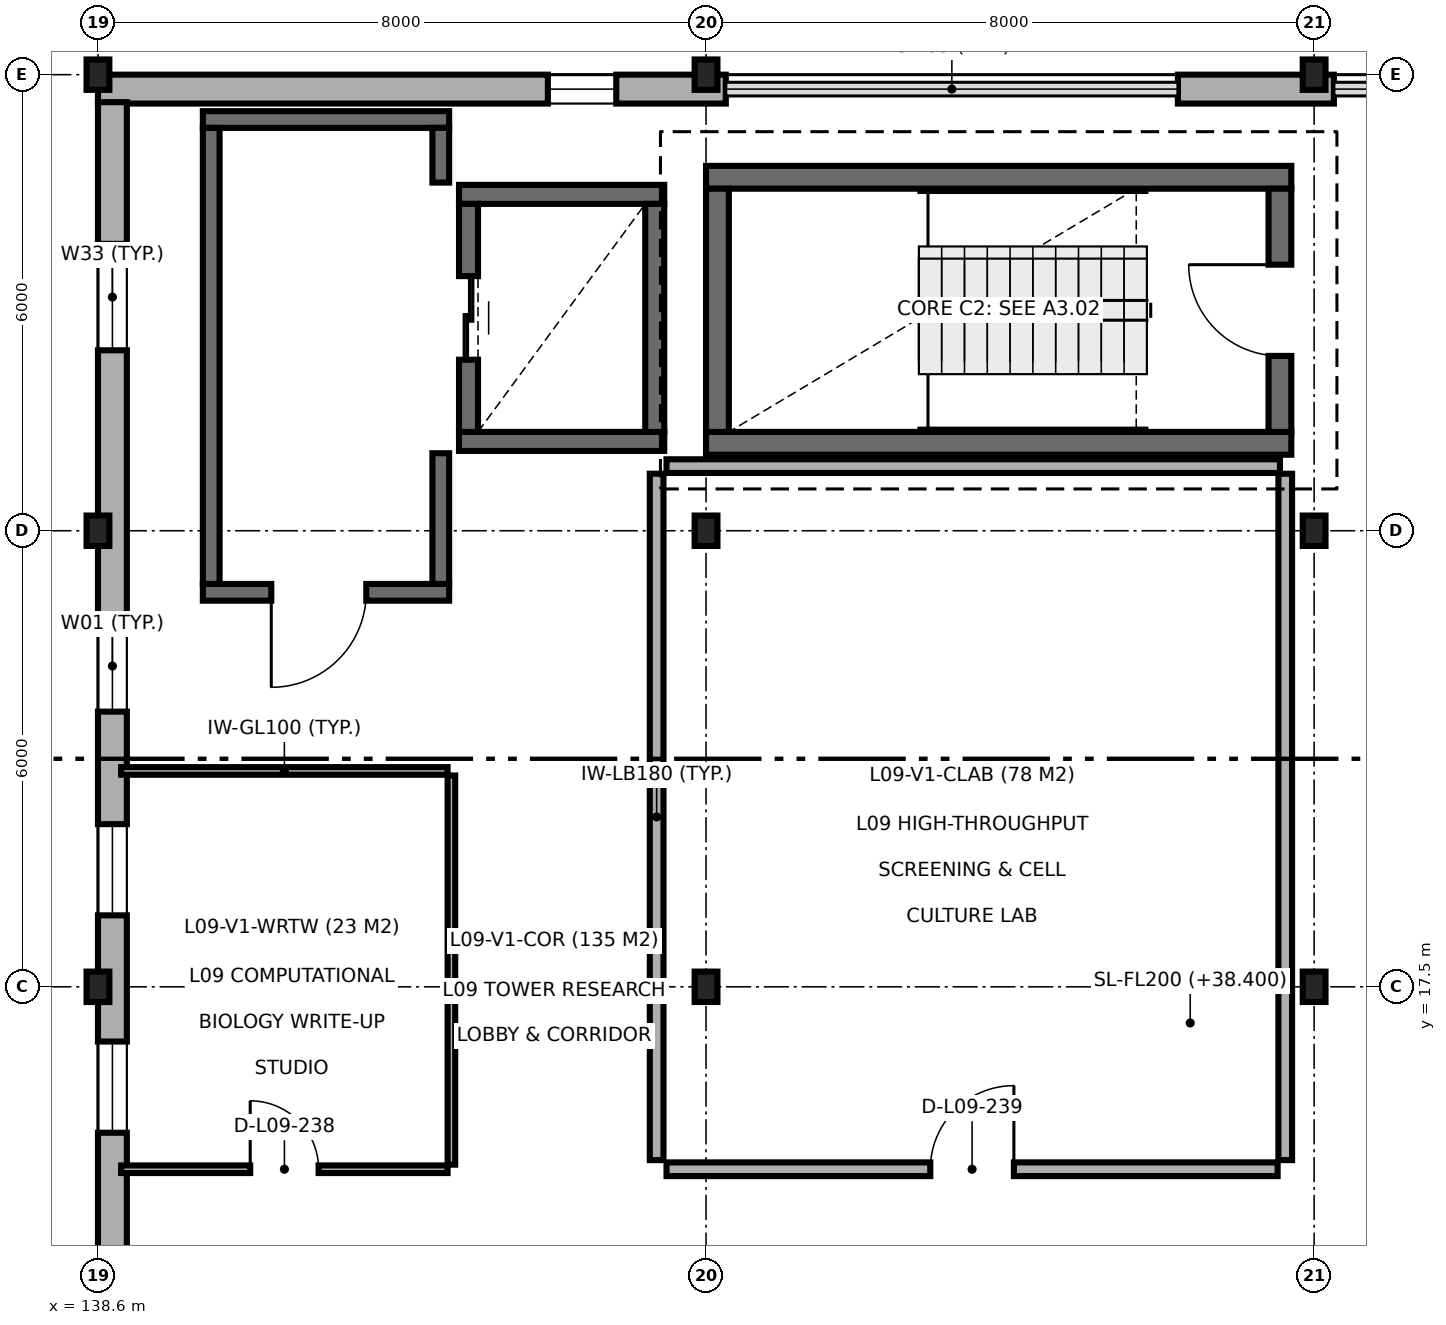
"""IFC4 building model, lengths in metres.
Left out: names, types, materials, properties, quantities, classifications, styles, units other than length and angle.
Written with IfcOpenShell. Run it as: python <this file> out.ifc"""

import sys

from ifc_helpers import new_model, si_unit, direction, frame, frame_2d, origin, origin_2d, place, context, subcontext, project, spatial, rectangle, i_section, extrude, element, fill, save


model = new_model("IFC4")
c1 = context("Model", 3, precision=1e-05, world=origin(), true_north=direction((0.0, 1.0)))
c2 = subcontext(c1, "Body", "Model", "MODEL_VIEW")
j1 = project(units=[si_unit("LENGTHUNIT", "METRE"), si_unit("PLANEANGLEUNIT", "RADIAN")], contexts=[c1])
p1 = place(None, origin())
s1 = spatial("IfcSite", under=j1, at=p1, CompositionType="ELEMENT")
p2 = place(p1, origin())
s2 = spatial("IfcBuilding", under=s1, at=p2, CompositionType="ELEMENT")
p3 = place(p2, frame((0.0, 0.0, 38.4)))
s3 = spatial("IfcBuildingStorey", under=s2, at=p3, CompositionType="ELEMENT", Elevation=38.4)
for number, where, z_axis, x_axis in (
    (1, (138.6, 17.5, 0.0), (0.0, 0.0, 1.0), (1.0, 0.0, 0.0)),
    (2, (138.6, 23.5, 0.0), (0.0, 0.0, 1.0), (1.0, 0.0, 0.0)),
    (3, (138.6, 29.5, 0.0), (0.0, 0.0, 1.0), (1.0, 0.0, 0.0)),
    (4, (146.6, 17.5, 0.0), (0.0, 0.0, 1.0), (1.0, 0.0, 0.0)),
    (5, (146.6, 23.5, 0.0), (0.0, 0.0, 1.0), (1.0, 0.0, 0.0)),
    (6, (146.6, 29.5, 0.0), (0.0, 0.0, 1.0), (1.0, 0.0, 0.0)),
    (7, (154.6, 17.5, 0.0), (0.0, 0.0, 1.0), (1.0, 0.0, 0.0)),
    (8, (154.6, 23.5, 0.0), (0.0, 0.0, 1.0), (1.0, 0.0, 0.0)),
    (9, (154.6, 29.5, 0.0), (0.0, 0.0, 1.0), (1.0, 0.0, 0.0)),
):
    element("IfcColumn", number, at=place(p3, frame(where, z_axis=z_axis, x_axis=x_axis)), inside=s3, PredefinedType="COLUMN", context=c2, shape_type="SweptSolid", body=[
        extrude(i_section(OverallWidth=0.3, OverallDepth=0.4, WebThickness=0.013, FlangeThickness=0.024, FilletRadius=0.027, at=origin_2d()), origin(), (0.0, 0.0, 1.0), 3.9),
    ])
for number, where, z_axis, x_axis in (
    (10, (146.6, 24.65, 0.0), (0.0, 0.0, 1.0), (1.0, 0.0, 0.0)),
    (11, (154.3, 28.15, 0.0), (0.0, 0.0, 1.0), (-1.0, 0.0, 0.0)),
):
    element("IfcWall", number, at=place(p3, frame(where, z_axis=z_axis, x_axis=x_axis)), inside=s3, PredefinedType="SHEAR", context=c2, shape_type="SweptSolid", body=[
        extrude(rectangle(XDim=7.7, YDim=0.3, at=frame_2d((3.85, 0.0))), origin(), (0.0, 0.0, 1.0), 3.9),
    ])
p4 = place(p3, frame((146.75, 28.0, 0.0), z_axis=(0.0, 0.0, 1.0), x_axis=(0.0, -1.0, 0.0)))
e12 = element("IfcWall", 12, at=p4, inside=s3, PredefinedType="SHEAR", context=c2, shape_type="SweptSolid", body=[
    extrude(rectangle(XDim=3.2, YDim=0.3, at=frame_2d((1.6, 0.0))), origin(), (0.0, 0.0, 1.0), 3.9),
])
p5 = place(p3, frame((154.15, 24.8, 0.0), z_axis=(0.0, 0.0, 1.0), x_axis=(0.0, 1.0, 0.0)))
e13 = element("IfcWall", 13, at=p5, inside=s3, PredefinedType="SHEAR", context=c2, shape_type="SweptSolid", body=[
    extrude(rectangle(XDim=3.2, YDim=0.3, at=frame_2d((1.6, 0.0))), origin(), (0.0, 0.0, 1.0), 3.9),
])
p6 = place(p5, frame((1.0, 0.0, 0.0)))
e14 = element("IfcOpeningElement", 14, at=p6, cuts=e13, PredefinedType="OPENING", context=c2, shape_type="SweptSolid", body=[
    extrude(rectangle(XDim=1.2, YDim=2.15, at=frame_2d((0.6, 1.075))), frame((0.0, 0.16, 0.0), z_axis=(0.0, -1.0, 0.0), x_axis=(1.0, 0.0, 0.0)), (0.0, 0.0, 1.0), 0.32),
])
for number, where, z_axis, x_axis in (
    (15, (143.35, 24.675, 0.0), (0.0, 0.0, 1.0), (1.0, 0.0, 0.0)),
    (16, (146.05, 27.925, 0.0), (0.0, 0.0, 1.0), (-1.0, 0.0, 0.0)),
):
    element("IfcWall", number, at=place(p3, frame(where, z_axis=z_axis, x_axis=x_axis)), inside=s3, PredefinedType="SHEAR", context=c2, shape_type="SweptSolid", body=[
        extrude(rectangle(XDim=2.7, YDim=0.25, at=frame_2d((1.35, 0.0))), origin(), (0.0, 0.0, 1.0), 3.9),
    ])
p7 = place(p3, frame((143.475, 27.8, 0.0), z_axis=(0.0, 0.0, 1.0), x_axis=(0.0, -1.0, 0.0)))
e17 = element("IfcWall", 17, at=p7, inside=s3, PredefinedType="SHEAR", context=c2, shape_type="SweptSolid", body=[
    extrude(rectangle(XDim=3.0, YDim=0.25, at=frame_2d((1.5, 0.0))), origin(), (0.0, 0.0, 1.0), 3.9),
])
p8 = place(p7, frame((0.95, 0.0, 0.0)))
e18 = element("IfcOpeningElement", 18, at=p8, cuts=e17, PredefinedType="OPENING", context=c2, shape_type="SweptSolid", body=[
    extrude(rectangle(XDim=1.1, YDim=2.15, at=frame_2d((0.55, 1.075))), frame((0.0, 0.135, 0.0), z_axis=(0.0, -1.0, 0.0), x_axis=(1.0, 0.0, 0.0)), (0.0, 0.0, 1.0), 0.27),
])
p9 = place(p3, frame((145.925, 24.8, 0.0), z_axis=(0.0, 0.0, 1.0), x_axis=(0.0, 1.0, 0.0)))
e19 = element("IfcWall", 19, at=p9, inside=s3, PredefinedType="SHEAR", context=c2, shape_type="SweptSolid", body=[
    extrude(rectangle(XDim=3.0, YDim=0.25, at=frame_2d((1.5, 0.0))), origin(), (0.0, 0.0, 1.0), 3.9),
])
p10 = place(p3, frame((139.98, 22.69, 0.0), z_axis=(0.0, 0.0, 1.0), x_axis=(1.0, 0.0, 0.0)))
e20 = element("IfcWall", 20, at=p10, inside=s3, PredefinedType="SOLIDWALL", context=c2, shape_type="SweptSolid", body=[
    extrude(rectangle(XDim=3.24, YDim=0.22, at=frame_2d((1.62, 0.0))), origin(), (0.0, 0.0, 1.0), 3.7),
])
p11 = place(p10, frame((0.9, 0.0, 0.0)))
e21 = element("IfcOpeningElement", 21, at=p11, cuts=e20, PredefinedType="OPENING", context=c2, shape_type="SweptSolid", body=[
    extrude(rectangle(XDim=1.25, YDim=2.15, at=frame_2d((0.625, 1.075))), frame((0.0, 0.12, 0.0), z_axis=(0.0, -1.0, 0.0), x_axis=(1.0, 0.0, 0.0)), (0.0, 0.0, 1.0), 0.24),
])
p12 = place(p3, frame((143.22, 28.91, 0.0), z_axis=(0.0, 0.0, 1.0), x_axis=(-1.0, 0.0, 0.0)))
e22 = element("IfcWall", 22, at=p12, inside=s3, PredefinedType="SOLIDWALL", context=c2, shape_type="SweptSolid", body=[
    extrude(rectangle(XDim=3.24, YDim=0.22, at=frame_2d((1.62, 0.0))), origin(), (0.0, 0.0, 1.0), 3.7),
])
p13 = place(p3, frame((140.09, 28.8, 0.0), z_axis=(0.0, 0.0, 1.0), x_axis=(0.0, -1.0, 0.0)))
e23 = element("IfcWall", 23, at=p13, inside=s3, PredefinedType="SOLIDWALL", context=c2, shape_type="SweptSolid", body=[
    extrude(rectangle(XDim=6.0, YDim=0.22, at=frame_2d((3.0, 0.0))), origin(), (0.0, 0.0, 1.0), 3.7),
])
p14 = place(p3, frame((143.11, 22.8, 0.0), z_axis=(0.0, 0.0, 1.0), x_axis=(0.0, 1.0, 0.0)))
e24 = element("IfcWall", 24, at=p14, inside=s3, PredefinedType="SOLIDWALL", context=c2, shape_type="SweptSolid", body=[
    extrude(rectangle(XDim=1.72, YDim=0.22, at=frame_2d((0.86, 0.0))), origin(), (0.0, 0.0, 1.0), 3.7),
])
p15 = place(p3, frame((143.11, 28.08, 0.0), z_axis=(0.0, 0.0, 1.0), x_axis=(0.0, 1.0, 0.0)))
e25 = element("IfcWall", 25, at=p15, inside=s3, PredefinedType="SOLIDWALL", context=c2, shape_type="SweptSolid", body=[
    extrude(rectangle(XDim=0.72, YDim=0.22, at=frame_2d((0.36, 0.0))), origin(), (0.0, 0.0, 1.0), 3.7),
])
p16 = place(p3, frame((154.86, 29.31, 0.0), z_axis=(0.0, 0.0, 1.0), x_axis=(-1.0, 0.0, 0.0)))
e26 = element("IfcWall", 26, at=p16, inside=s3, PredefinedType="SOLIDWALL", context=c2, shape_type="SweptSolid", body=[
    extrude(rectangle(XDim=2.052, YDim=0.38, at=frame_2d((1.026, 0.0))), origin(), (0.0, 0.0, 1.0), 3.7),
])
p17 = place(p3, frame((146.86, 29.31, 0.0), z_axis=(0.0, 0.0, 1.0), x_axis=(-1.0, 0.0, 0.0)))
e27 = element("IfcWall", 27, at=p17, inside=s3, PredefinedType="SOLIDWALL", context=c2, shape_type="SweptSolid", body=[
    extrude(rectangle(XDim=8.26, YDim=0.38, at=frame_2d((4.13, 0.0))), origin(), (0.0, 0.0, 1.0), 3.7),
])
p18 = place(p17, frame((1.441, 0.0, 0.9)))
e28 = element("IfcOpeningElement", 28, at=p18, cuts=e27, PredefinedType="OPENING", context=c2, shape_type="SweptSolid", body=[
    extrude(rectangle(XDim=0.9, YDim=1.8, at=frame_2d((0.45, 0.9))), frame((0.0, 0.2, 0.0), z_axis=(0.0, -1.0, 0.0), x_axis=(1.0, 0.0, 0.0)), (0.0, 0.0, 1.0), 0.4),
])
p19 = place(p3, frame((138.79, 29.138, 0.0), z_axis=(0.0, 0.0, 1.0), x_axis=(0.0, -1.0, 0.0)))
e29 = element("IfcWall", 29, at=p19, inside=s3, PredefinedType="SOLIDWALL", context=c2, shape_type="SweptSolid", body=[
    extrude(rectangle(XDim=24.238, YDim=0.38, at=frame_2d((12.119, 0.0))), origin(), (0.0, 0.0, 1.0), 3.7),
])
p20 = place(p19, frame((1.864, 0.0, 0.9)))
e30 = element("IfcOpeningElement", 30, at=p20, cuts=e29, PredefinedType="OPENING", context=c2, shape_type="SweptSolid", body=[
    extrude(rectangle(XDim=1.4, YDim=1.65, at=frame_2d((0.7, 0.825))), frame((0.0, 0.2, 0.0), z_axis=(0.0, -1.0, 0.0), x_axis=(1.0, 0.0, 0.0)), (0.0, 0.0, 1.0), 0.4),
])
p21 = place(p19, frame((6.818, 0.0, 0.9)))
e31 = element("IfcOpeningElement", 31, at=p21, cuts=e29, PredefinedType="OPENING", context=c2, shape_type="SweptSolid", body=[
    extrude(rectangle(XDim=1.2, YDim=1.8, at=frame_2d((0.6, 0.9))), frame((0.0, 0.2, 0.0), z_axis=(0.0, -1.0, 0.0), x_axis=(1.0, 0.0, 0.0)), (0.0, 0.0, 1.0), 0.4),
])
p22 = place(p19, frame((9.498, 0.0, 0.9)))
e32 = element("IfcOpeningElement", 32, at=p22, cuts=e29, PredefinedType="OPENING", context=c2, shape_type="SweptSolid", body=[
    extrude(rectangle(XDim=1.2, YDim=1.8, at=frame_2d((0.6, 0.9))), frame((0.0, 0.2, 0.0), z_axis=(0.0, -1.0, 0.0), x_axis=(1.0, 0.0, 0.0)), (0.0, 0.0, 1.0), 0.4),
])
p23 = place(p19, frame((12.358, 0.0, 0.9)))
e33 = element("IfcOpeningElement", 33, at=p23, cuts=e29, PredefinedType="OPENING", context=c2, shape_type="SweptSolid", body=[
    extrude(rectangle(XDim=1.2, YDim=1.8, at=frame_2d((0.6, 0.9))), frame((0.0, 0.2, 0.0), z_axis=(0.0, -1.0, 0.0), x_axis=(1.0, 0.0, 0.0)), (0.0, 0.0, 1.0), 0.4),
])
p24 = place(p19, frame((15.718, 0.0, 0.9)))
e34 = element("IfcOpeningElement", 34, at=p24, cuts=e29, PredefinedType="OPENING", context=c2, shape_type="SweptSolid", body=[
    extrude(rectangle(XDim=1.2, YDim=1.8, at=frame_2d((0.6, 0.9))), frame((0.0, 0.2, 0.0), z_axis=(0.0, -1.0, 0.0), x_axis=(1.0, 0.0, 0.0)), (0.0, 0.0, 1.0), 0.4),
])
p25 = place(p19, frame((19.878, 0.0, 0.9)))
e35 = element("IfcOpeningElement", 35, at=p25, cuts=e29, PredefinedType="OPENING", context=c2, shape_type="SweptSolid", body=[
    extrude(rectangle(XDim=1.5, YDim=2.1, at=frame_2d((0.75, 1.05))), frame((0.0, 0.2, 0.0), z_axis=(0.0, -1.0, 0.0), x_axis=(1.0, 0.0, 0.0)), (0.0, 0.0, 1.0), 0.4),
])
p26 = place(p3, frame((138.905, 20.34, 0.0), z_axis=(0.0, 0.0, 1.0), x_axis=(1.0, 0.0, 0.0)))
e36 = element("IfcWall", 36, at=p26, inside=s3, PredefinedType="PARTITIONING", context=c2, shape_type="SweptSolid", body=[
    extrude(rectangle(XDim=4.295, YDim=0.1, at=frame_2d((2.147, 0.0))), origin(), (0.0, 0.0, 1.0), 3.7),
])
p27 = place(p3, frame((143.25, 15.16, 0.0), z_axis=(0.0, 0.0, 1.0), x_axis=(0.0, 1.0, 0.0)))
e37 = element("IfcWall", 37, at=p27, inside=s3, PredefinedType="PARTITIONING", context=c2, shape_type="SweptSolid", body=[
    extrude(rectangle(XDim=5.12, YDim=0.1, at=frame_2d((2.56, 0.0))), origin(), (0.0, 0.0, 1.0), 3.7),
])
p28 = place(p3, frame((138.905, 15.1, 0.0), z_axis=(0.0, 0.0, 1.0), x_axis=(1.0, 0.0, 0.0)))
e38 = element("IfcWall", 38, at=p28, inside=s3, PredefinedType="PARTITIONING", context=c2, shape_type="SweptSolid", body=[
    extrude(rectangle(XDim=4.295, YDim=0.1, at=frame_2d((2.147, 0.0))), origin(), (0.0, 0.0, 1.0), 3.7),
])
p29 = place(p28, frame((1.698, 0.0, 0.0)))
e39 = element("IfcOpeningElement", 39, at=p29, cuts=e38, PredefinedType="OPENING", context=c2, shape_type="SweptSolid", body=[
    extrude(rectangle(XDim=0.9, YDim=2.1, at=frame_2d((0.45, 1.05))), frame((0.0, 0.06, 0.0), z_axis=(0.0, -1.0, 0.0), x_axis=(1.0, 0.0, 0.0)), (0.0, 0.0, 1.0), 0.12),
])
p30 = place(p3, frame((145.95, 15.22, 0.0), z_axis=(0.0, 0.0, 1.0), x_axis=(0.0, 1.0, 0.0)))
e40 = element("IfcWall", 40, at=p30, inside=s3, PredefinedType="PARTITIONING", context=c2, shape_type="SweptSolid", body=[
    extrude(rectangle(XDim=9.03, YDim=0.18, at=frame_2d((4.515, 0.0))), origin(), (0.0, 0.0, 1.0), 3.7),
])
p31 = place(p3, frame((146.08, 24.35, 0.0), z_axis=(0.0, 0.0, 1.0), x_axis=(1.0, 0.0, 0.0)))
e41 = element("IfcWall", 41, at=p31, inside=s3, PredefinedType="PARTITIONING", context=c2, shape_type="SweptSolid", body=[
    extrude(rectangle(XDim=8.07, YDim=0.18, at=frame_2d((4.035, 0.0))), origin(), (0.0, 0.0, 1.0), 2.93),
])
p32 = place(p3, frame((154.22, 15.22, 0.0), z_axis=(0.0, 0.0, 1.0), x_axis=(0.0, 1.0, 0.0)))
e42 = element("IfcWall", 42, at=p32, inside=s3, PredefinedType="PARTITIONING", context=c2, shape_type="SweptSolid", body=[
    extrude(rectangle(XDim=9.03, YDim=0.18, at=frame_2d((4.515, 0.0))), origin(), (0.0, 0.0, 1.0), 3.7),
])
p33 = place(p3, frame((146.08, 15.1, 0.0), z_axis=(0.0, 0.0, 1.0), x_axis=(1.0, 0.0, 0.0)))
e43 = element("IfcWall", 43, at=p33, inside=s3, PredefinedType="PARTITIONING", context=c2, shape_type="SweptSolid", body=[
    extrude(rectangle(XDim=8.04, YDim=0.18, at=frame_2d((4.02, 0.0))), origin(), (0.0, 0.0, 1.0), 3.7),
])
p34 = place(p33, frame((3.47, 0.0, 0.0)))
e44 = element("IfcOpeningElement", 44, at=p34, cuts=e43, PredefinedType="OPENING", context=c2, shape_type="SweptSolid", body=[
    extrude(rectangle(XDim=1.1, YDim=2.15, at=frame_2d((0.55, 1.075))), frame((0.0, 0.1, 0.0), z_axis=(0.0, -1.0, 0.0), x_axis=(1.0, 0.0, 0.0)), (0.0, 0.0, 1.0), 0.2),
])
p35 = place(p6, origin())
e45 = element("IfcDoor", 45, at=p35, inside=s3, OperationType="SINGLE_SWING_RIGHT", PredefinedType="DOOR", context=c2, shape_type="SweptSolid", body=[
    extrude(rectangle(XDim=1.2, YDim=2.15, at=frame_2d((0.6, 1.075))), frame((0.0, 0.025, 0.0), z_axis=(0.0, -1.0, 0.0), x_axis=(1.0, 0.0, 0.0)), (0.0, 0.0, 1.0), 0.05),
])
fill(e14, e45)
p36 = place(p8, origin())
e46 = element("IfcDoor", 46, at=p36, inside=s3, OperationType="DOUBLE_DOOR_SLIDING", PredefinedType="DOOR", context=c2, shape_type="SweptSolid", body=[
    extrude(rectangle(XDim=1.1, YDim=2.15, at=frame_2d((0.55, 1.075))), frame((0.0, 0.025, 0.0), z_axis=(0.0, -1.0, 0.0), x_axis=(1.0, 0.0, 0.0)), (0.0, 0.0, 1.0), 0.05),
])
fill(e18, e46)
p37 = place(p11, frame((1.25, 0.0, 0.0), z_axis=(0.0, 0.0, 1.0), x_axis=(-1.0, 0.0, 0.0)))
e47 = element("IfcDoor", 47, at=p37, inside=s3, OperationType="SINGLE_SWING_LEFT", PredefinedType="DOOR", context=c2, shape_type="SweptSolid", body=[
    extrude(rectangle(XDim=1.25, YDim=2.15, at=frame_2d((0.625, 1.075))), frame((0.0, 0.025, 0.0), z_axis=(0.0, -1.0, 0.0), x_axis=(1.0, 0.0, 0.0)), (0.0, 0.0, 1.0), 0.05),
])
fill(e21, e47)
p38 = place(p18, origin())
e48 = element("IfcWindow", 48, at=p38, inside=s3, PartitioningType="SINGLE_PANEL", PredefinedType="WINDOW", context=c2, shape_type="SweptSolid", body=[
    extrude(rectangle(XDim=0.9, YDim=1.8, at=frame_2d((0.45, 0.9))), frame((0.0, 0.03, 0.0), z_axis=(0.0, -1.0, 0.0), x_axis=(1.0, 0.0, 0.0)), (0.0, 0.0, 1.0), 0.06),
])
fill(e28, e48)
p39 = place(p20, origin())
e49 = element("IfcWindow", 49, at=p39, inside=s3, PartitioningType="SINGLE_PANEL", PredefinedType="WINDOW", context=c2, shape_type="SweptSolid", body=[
    extrude(rectangle(XDim=1.4, YDim=1.65, at=frame_2d((0.7, 0.825))), frame((0.0, 0.03, 0.0), z_axis=(0.0, -1.0, 0.0), x_axis=(1.0, 0.0, 0.0)), (0.0, 0.0, 1.0), 0.06),
])
fill(e30, e49)
p40 = place(p21, origin())
e50 = element("IfcWindow", 50, at=p40, inside=s3, PartitioningType="SINGLE_PANEL", PredefinedType="WINDOW", context=c2, shape_type="SweptSolid", body=[
    extrude(rectangle(XDim=1.2, YDim=1.8, at=frame_2d((0.6, 0.9))), frame((0.0, 0.03, 0.0), z_axis=(0.0, -1.0, 0.0), x_axis=(1.0, 0.0, 0.0)), (0.0, 0.0, 1.0), 0.06),
])
fill(e31, e50)
p41 = place(p22, origin())
e51 = element("IfcWindow", 51, at=p41, inside=s3, PartitioningType="SINGLE_PANEL", PredefinedType="WINDOW", context=c2, shape_type="SweptSolid", body=[
    extrude(rectangle(XDim=1.2, YDim=1.8, at=frame_2d((0.6, 0.9))), frame((0.0, 0.03, 0.0), z_axis=(0.0, -1.0, 0.0), x_axis=(1.0, 0.0, 0.0)), (0.0, 0.0, 1.0), 0.06),
])
fill(e32, e51)
p42 = place(p23, origin())
e52 = element("IfcWindow", 52, at=p42, inside=s3, PartitioningType="SINGLE_PANEL", PredefinedType="WINDOW", context=c2, shape_type="SweptSolid", body=[
    extrude(rectangle(XDim=1.2, YDim=1.8, at=frame_2d((0.6, 0.9))), frame((0.0, 0.03, 0.0), z_axis=(0.0, -1.0, 0.0), x_axis=(1.0, 0.0, 0.0)), (0.0, 0.0, 1.0), 0.06),
])
fill(e33, e52)
p43 = place(p29, origin())
e53 = element("IfcDoor", 53, at=p43, inside=s3, OperationType="SINGLE_SWING_LEFT", PredefinedType="DOOR", context=c2, shape_type="SweptSolid", body=[
    extrude(rectangle(XDim=0.9, YDim=2.1, at=frame_2d((0.45, 1.05))), frame((0.0, 0.025, 0.0), z_axis=(0.0, -1.0, 0.0), x_axis=(1.0, 0.0, 0.0)), (0.0, 0.0, 1.0), 0.05),
])
fill(e39, e53)
p44 = place(p34, origin())
e54 = element("IfcDoor", 54, at=p44, inside=s3, OperationType="SINGLE_SWING_RIGHT", PredefinedType="DOOR", context=c2, shape_type="SweptSolid", body=[
    extrude(rectangle(XDim=1.1, YDim=2.15, at=frame_2d((0.55, 1.075))), frame((0.0, 0.025, 0.0), z_axis=(0.0, -1.0, 0.0), x_axis=(1.0, 0.0, 0.0)), (0.0, 0.0, 1.0), 0.05),
])
fill(e44, e54)
save(model, sys.argv[1])
